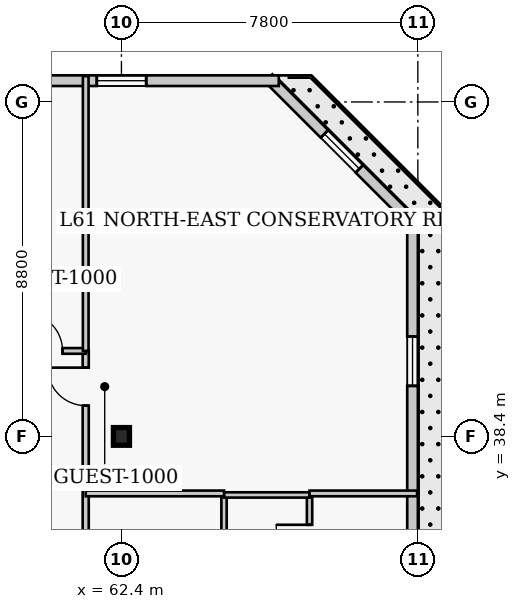
"""IFC4 building model, lengths in metres.
Left out: names, types, materials, properties, quantities, classifications, styles, units other than length and angle.
Written with IfcOpenShell. Run it as: python <this file> out.ifc"""

import sys

from ifc_helpers import new_model, si_unit, direction, frame, frame_2d, origin, origin_2d, place, context, subcontext, project, spatial, rectangle, i_section, extrude, element, fill, save


model = new_model("IFC4")
c1 = context("Model", 3, precision=1e-05, world=origin(), true_north=direction((0.0, 1.0)))
c2 = subcontext(c1, "Body", "Model", "MODEL_VIEW")
j1 = project(units=[si_unit("LENGTHUNIT", "METRE"), si_unit("PLANEANGLEUNIT", "RADIAN")], contexts=[c1])
p1 = place(None, origin())
s1 = spatial("IfcSite", under=j1, at=p1, CompositionType="ELEMENT")
p2 = place(p1, origin())
s2 = spatial("IfcBuilding", under=s1, at=p2, CompositionType="ELEMENT")
p3 = place(p2, frame((0.0, 0.0, 245.4)))
s3 = spatial("IfcBuildingStorey", under=s2, at=p3, CompositionType="ELEMENT", Elevation=245.4)
p4 = place(p3, frame((62.4, 38.4, 0.0), z_axis=(0.0, 0.0, 1.0), x_axis=(1.0, 0.0, 0.0)))
e1 = element("IfcColumn", 1, at=p4, inside=s3, PredefinedType="COLUMN", context=c2, shape_type="SweptSolid", body=[
    extrude(i_section(OverallWidth=0.422, OverallDepth=0.465, WebThickness=0.045, FlangeThickness=0.073, FilletRadius=0.017, at=origin_2d()), origin(), (0.0, 0.0, 1.0), 4.0),
])
p5 = place(p3, frame((70.06, 13.36, 0.0), z_axis=(0.0, 0.0, 1.0), x_axis=(0.0, 1.0, 0.0)))
e2 = element("IfcWall", 2, at=p5, inside=s3, PredefinedType="SOLIDWALL", context=c2, shape_type="SweptSolid", body=[
    extrude(rectangle(XDim=30.88, YDim=0.28, at=frame_2d((15.44, 0.0))), origin(), (0.0, 0.0, 1.0), 3.76),
])
p6 = place(p5, frame((3.21, 0.0, 0.85)))
e3 = element("IfcOpeningElement", 3, at=p6, cuts=e2, PredefinedType="OPENING", context=c2, shape_type="SweptSolid", body=[
    extrude(rectangle(XDim=1.3, YDim=1.7, at=frame_2d((0.65, 0.85))), frame((0.0, 0.15, 0.0), z_axis=(0.0, -1.0, 0.0), x_axis=(1.0, 0.0, 0.0)), (0.0, 0.0, 1.0), 0.3),
])
p7 = place(p5, frame((10.93, 0.0, 0.85)))
e4 = element("IfcOpeningElement", 4, at=p7, cuts=e2, PredefinedType="OPENING", context=c2, shape_type="SweptSolid", body=[
    extrude(rectangle(XDim=1.3, YDim=1.7, at=frame_2d((0.65, 0.85))), frame((0.0, 0.15, 0.0), z_axis=(0.0, -1.0, 0.0), x_axis=(1.0, 0.0, 0.0)), (0.0, 0.0, 1.0), 0.3),
])
p8 = place(p5, frame((18.65, 0.0, 0.85)))
e5 = element("IfcOpeningElement", 5, at=p8, cuts=e2, PredefinedType="OPENING", context=c2, shape_type="SweptSolid", body=[
    extrude(rectangle(XDim=1.3, YDim=1.7, at=frame_2d((0.65, 0.85))), frame((0.0, 0.15, 0.0), z_axis=(0.0, -1.0, 0.0), x_axis=(1.0, 0.0, 0.0)), (0.0, 0.0, 1.0), 0.3),
])
p9 = place(p5, frame((26.37, 0.0, 0.85)))
e6 = element("IfcOpeningElement", 6, at=p9, cuts=e2, PredefinedType="OPENING", context=c2, shape_type="SweptSolid", body=[
    extrude(rectangle(XDim=1.3, YDim=1.7, at=frame_2d((0.65, 0.85))), frame((0.0, 0.15, 0.0), z_axis=(0.0, -1.0, 0.0), x_axis=(1.0, 0.0, 0.0)), (0.0, 0.0, 1.0), 0.3),
])
p10 = place(p3, frame((70.129, 43.973, 0.0), z_axis=(0.0, 0.0, 1.0), x_axis=(-0.707106781187, 0.707106781187, 0.0)))
e7 = element("IfcWall", 7, at=p10, inside=s3, PredefinedType="SOLIDWALL", context=c2, shape_type="SweptSolid", body=[
    extrude(rectangle(XDim=5.454, YDim=0.28, at=frame_2d((2.727, 0.0))), origin(), (0.0, 0.0, 1.0), 3.76),
])
p11 = place(p10, frame((2.077, 0.0, 0.85)))
e8 = element("IfcOpeningElement", 8, at=p11, cuts=e7, PredefinedType="OPENING", context=c2, shape_type="SweptSolid", body=[
    extrude(rectangle(XDim=1.3, YDim=1.7, at=frame_2d((0.65, 0.85))), frame((0.0, 0.15, 0.0), z_axis=(0.0, -1.0, 0.0), x_axis=(1.0, 0.0, 0.0)), (0.0, 0.0, 1.0), 0.3),
])
p12 = place(p3, frame((66.54, 47.76, 0.0), z_axis=(0.0, 0.0, 1.0), x_axis=(-1.0, 0.0, 0.0)))
e9 = element("IfcWall", 9, at=p12, inside=s3, PredefinedType="SOLIDWALL", context=c2, shape_type="SweptSolid", body=[
    extrude(rectangle(XDim=24.83, YDim=0.28, at=frame_2d((12.415, 0.0))), origin(), (0.0, 0.0, 1.0), 3.76),
])
p13 = place(p12, frame((3.488, 0.0, 0.85)))
e10 = element("IfcOpeningElement", 10, at=p13, cuts=e9, PredefinedType="OPENING", context=c2, shape_type="SweptSolid", body=[
    extrude(rectangle(XDim=1.3, YDim=1.7, at=frame_2d((0.65, 0.85))), frame((0.0, 0.15, 0.0), z_axis=(0.0, -1.0, 0.0), x_axis=(1.0, 0.0, 0.0)), (0.0, 0.0, 1.0), 0.3),
])
p14 = place(p12, frame((12.915, 0.0, 0.85)))
e11 = element("IfcOpeningElement", 11, at=p14, cuts=e9, PredefinedType="OPENING", context=c2, shape_type="SweptSolid", body=[
    extrude(rectangle(XDim=1.3, YDim=1.7, at=frame_2d((0.65, 0.85))), frame((0.0, 0.15, 0.0), z_axis=(0.0, -1.0, 0.0), x_axis=(1.0, 0.0, 0.0)), (0.0, 0.0, 1.0), 0.3),
])
p15 = place(p12, frame((20.692, 0.0, 0.85)))
e12 = element("IfcOpeningElement", 12, at=p15, cuts=e9, PredefinedType="OPENING", context=c2, shape_type="SweptSolid", body=[
    extrude(rectangle(XDim=1.3, YDim=1.7, at=frame_2d((0.65, 0.85))), frame((0.0, 0.15, 0.0), z_axis=(0.0, -1.0, 0.0), x_axis=(1.0, 0.0, 0.0)), (0.0, 0.0, 1.0), 0.3),
])
p16 = place(p3, frame((61.46, 23.55, 0.0), z_axis=(0.0, 0.0, 1.0), x_axis=(0.0, 1.0, 0.0)))
e13 = element("IfcWall", 13, at=p16, inside=s3, PredefinedType="PARTITIONING", context=c2, shape_type="SweptSolid", body=[
    extrude(rectangle(XDim=17.1, YDim=0.16, at=frame_2d((8.55, 0.0))), origin(), (0.0, 0.0, 1.0), 3.76),
])
p17 = place(p16, frame((2.15, 0.0, 0.0)))
e14 = element("IfcOpeningElement", 14, at=p17, cuts=e13, PredefinedType="OPENING", context=c2, shape_type="SweptSolid", body=[
    extrude(rectangle(XDim=0.95, YDim=2.1, at=frame_2d((0.475, 1.05))), frame((0.0, 0.09, 0.0), z_axis=(0.0, -1.0, 0.0), x_axis=(1.0, 0.0, 0.0)), (0.0, 0.0, 1.0), 0.18),
])
p18 = place(p16, frame((8.825, 0.0, 0.0)))
e15 = element("IfcOpeningElement", 15, at=p18, cuts=e13, PredefinedType="OPENING", context=c2, shape_type="SweptSolid", body=[
    extrude(rectangle(XDim=0.95, YDim=2.1, at=frame_2d((0.475, 1.05))), frame((0.0, 0.09, 0.0), z_axis=(0.0, -1.0, 0.0), x_axis=(1.0, 0.0, 0.0)), (0.0, 0.0, 1.0), 0.18),
])
p19 = place(p16, frame((15.66, 0.0, 0.0)))
e16 = element("IfcOpeningElement", 16, at=p19, cuts=e13, PredefinedType="OPENING", context=c2, shape_type="SweptSolid", body=[
    extrude(rectangle(XDim=1.0, YDim=2.15, at=frame_2d((0.5, 1.075))), frame((0.0, 0.09, 0.0), z_axis=(0.0, -1.0, 0.0), x_axis=(1.0, 0.0, 0.0)), (0.0, 0.0, 1.0), 0.18),
])
p20 = place(p3, frame((56.8, 40.65, 0.0), z_axis=(0.0, 0.0, 1.0), x_axis=(1.0, 0.0, 0.0)))
e17 = element("IfcWall", 17, at=p20, inside=s3, PredefinedType="PARTITIONING", context=c2, shape_type="SweptSolid", body=[
    extrude(rectangle(XDim=4.66, YDim=0.15, at=frame_2d((2.33, 0.0))), origin(), (0.0, 0.0, 1.0), 3.76),
])
p21 = place(p20, frame((3.05, 0.0, 0.0)))
e18 = element("IfcOpeningElement", 18, at=p21, cuts=e17, PredefinedType="OPENING", context=c2, shape_type="SweptSolid", body=[
    extrude(rectangle(XDim=1.0, YDim=2.15, at=frame_2d((0.5, 1.075))), frame((0.0, 0.085, 0.0), z_axis=(0.0, -1.0, 0.0), x_axis=(1.0, 0.0, 0.0)), (0.0, 0.0, 1.0), 0.17),
])
p22 = place(p3, frame((61.46, 40.65, 0.0), z_axis=(0.0, 0.0, 1.0), x_axis=(0.0, 1.0, 0.0)))
e19 = element("IfcWall", 19, at=p22, inside=s3, PredefinedType="PARTITIONING", context=c2, shape_type="SweptSolid", body=[
    extrude(rectangle(XDim=7.23, YDim=0.15, at=frame_2d((3.615, 0.0))), origin(), (0.0, 0.0, 1.0), 3.76),
])
p23 = place(p3, frame((65.1, 34.41, 0.0), z_axis=(0.0, 0.0, 1.0), x_axis=(0.0, 1.0, 0.0)))
e20 = element("IfcWall", 20, at=p23, inside=s3, PredefinedType="PLUMBINGWALL", context=c2, shape_type="SweptSolid", body=[
    extrude(rectangle(XDim=2.45, YDim=0.14, at=frame_2d((1.225, 0.0))), origin(), (0.0, 0.0, 1.0), 3.76),
])
p24 = place(p3, frame((67.35, 34.41, 0.0), z_axis=(0.0, 0.0, 1.0), x_axis=(0.0, 1.0, 0.0)))
e21 = element("IfcWall", 21, at=p24, inside=s3, PredefinedType="PLUMBINGWALL", context=c2, shape_type="SweptSolid", body=[
    extrude(rectangle(XDim=2.45, YDim=0.14, at=frame_2d((1.225, 0.0))), origin(), (0.0, 0.0, 1.0), 3.76),
])
p25 = place(p24, frame((0.785, 0.0, 0.0)))
e22 = element("IfcOpeningElement", 22, at=p25, cuts=e21, PredefinedType="OPENING", context=c2, shape_type="SweptSolid", body=[
    extrude(rectangle(XDim=0.88, YDim=2.05, at=frame_2d((0.44, 1.025))), frame((0.0, 0.08, 0.0), z_axis=(0.0, -1.0, 0.0), x_axis=(1.0, 0.0, 0.0)), (0.0, 0.0, 1.0), 0.16),
])
p26 = place(p3, frame((65.1, 36.86, 0.0), z_axis=(0.0, 0.0, 1.0), x_axis=(1.0, 0.0, 0.0)))
e23 = element("IfcWall", 23, at=p26, inside=s3, PredefinedType="PLUMBINGWALL", context=c2, shape_type="SweptSolid", body=[
    extrude(rectangle(XDim=2.25, YDim=0.14, at=frame_2d((1.125, 0.0))), origin(), (0.0, 0.0, 1.0), 3.76),
])
p27 = place(p3, frame((61.46, 36.9, 0.0), z_axis=(0.0, 0.0, 1.0), x_axis=(1.0, 0.0, 0.0)))
e24 = element("IfcWall", 24, at=p27, inside=s3, PredefinedType="PARTITIONING", context=c2, shape_type="SweptSolid", body=[
    extrude(rectangle(XDim=3.64, YDim=0.15, at=frame_2d((1.82, 0.0))), origin(), (0.0, 0.0, 1.0), 3.76),
])
p28 = place(p3, frame((67.35, 36.9, 0.0), z_axis=(0.0, 0.0, 1.0), x_axis=(1.0, 0.0, 0.0)))
e25 = element("IfcWall", 25, at=p28, inside=s3, PredefinedType="PARTITIONING", context=c2, shape_type="SweptSolid", body=[
    extrude(rectangle(XDim=2.83, YDim=0.15, at=frame_2d((1.415, 0.0))), origin(), (0.0, 0.0, 1.0), 3.76),
])
p29 = place(p9, origin())
e26 = element("IfcWindow", 26, at=p29, inside=s3, PartitioningType="SINGLE_PANEL", PredefinedType="WINDOW", context=c2, shape_type="SweptSolid", body=[
    extrude(rectangle(XDim=1.3, YDim=1.7, at=frame_2d((0.65, 0.85))), frame((0.0, 0.03, 0.0), z_axis=(0.0, -1.0, 0.0), x_axis=(1.0, 0.0, 0.0)), (0.0, 0.0, 1.0), 0.06),
])
fill(e6, e26)
p30 = place(p11, origin())
e27 = element("IfcWindow", 27, at=p30, inside=s3, PartitioningType="SINGLE_PANEL", PredefinedType="WINDOW", context=c2, shape_type="SweptSolid", body=[
    extrude(rectangle(XDim=1.3, YDim=1.7, at=frame_2d((0.65, 0.85))), frame((0.0, 0.03, 0.0), z_axis=(0.0, -1.0, 0.0), x_axis=(1.0, 0.0, 0.0)), (0.0, 0.0, 1.0), 0.06),
])
fill(e8, e27)
p31 = place(p13, origin())
e28 = element("IfcWindow", 28, at=p31, inside=s3, PartitioningType="SINGLE_PANEL", PredefinedType="WINDOW", context=c2, shape_type="SweptSolid", body=[
    extrude(rectangle(XDim=1.3, YDim=1.7, at=frame_2d((0.65, 0.85))), frame((0.0, 0.03, 0.0), z_axis=(0.0, -1.0, 0.0), x_axis=(1.0, 0.0, 0.0)), (0.0, 0.0, 1.0), 0.06),
])
fill(e10, e28)
p32 = place(p21, origin())
e29 = element("IfcDoor", 29, at=p32, inside=s3, OperationType="SINGLE_SWING_LEFT", PredefinedType="DOOR", context=c2, shape_type="SweptSolid", body=[
    extrude(rectangle(XDim=1.0, YDim=2.15, at=frame_2d((0.5, 1.075))), frame((0.0, 0.025, 0.0), z_axis=(0.0, -1.0, 0.0), x_axis=(1.0, 0.0, 0.0)), (0.0, 0.0, 1.0), 0.05),
])
fill(e18, e29)
p33 = place(p25, origin())
e30 = element("IfcDoor", 30, at=p33, inside=s3, OperationType="SINGLE_SWING_RIGHT", PredefinedType="DOOR", context=c2, shape_type="SweptSolid", body=[
    extrude(rectangle(XDim=0.88, YDim=2.05, at=frame_2d((0.44, 1.025))), frame((0.0, 0.025, 0.0), z_axis=(0.0, -1.0, 0.0), x_axis=(1.0, 0.0, 0.0)), (0.0, 0.0, 1.0), 0.05),
])
fill(e22, e30)
p34 = place(p19, origin())
e31 = element("IfcDoor", 31, at=p34, inside=s3, OperationType="SINGLE_SWING_RIGHT", PredefinedType="DOOR", context=c2, shape_type="SweptSolid", body=[
    extrude(rectangle(XDim=1.0, YDim=2.15, at=frame_2d((0.5, 1.075))), frame((0.0, 0.025, 0.0), z_axis=(0.0, -1.0, 0.0), x_axis=(1.0, 0.0, 0.0)), (0.0, 0.0, 1.0), 0.05),
])
fill(e16, e31)
save(model, sys.argv[1])
